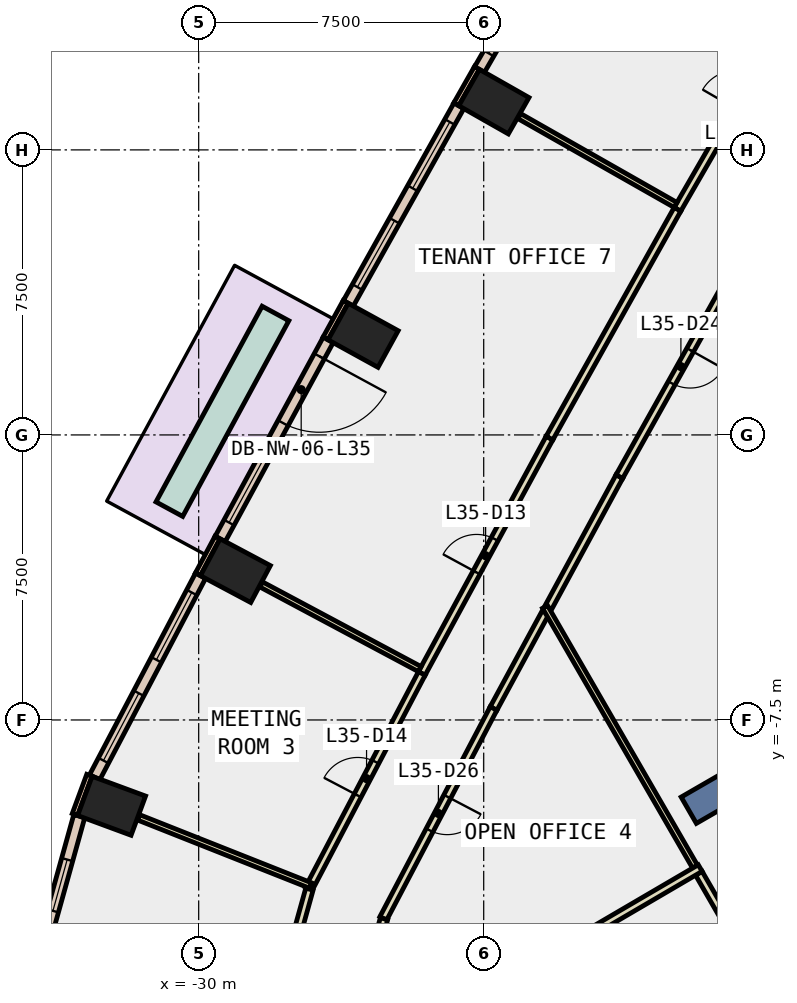
"""IFC4 building model, lengths in metres.
Left out: names, types, materials, properties, quantities, classifications, styles, units other than length and angle.
Written with IfcOpenShell. Run it as: python <this file> out.ifc"""

import sys

from ifc_helpers import new_model, si_unit, direction, frame, frame_2d, origin, origin_2d, place, context, subcontext, project, spatial, rectangle, extrude, element, fill, save


model = new_model("IFC4")
c1 = context("Model", 3, precision=1e-05, world=origin(), true_north=direction((0.0, 1.0)))
c2 = subcontext(c1, "Body", "Model", "MODEL_VIEW")
j1 = project(units=[si_unit("LENGTHUNIT", "METRE"), si_unit("PLANEANGLEUNIT", "RADIAN")], contexts=[c1])
p1 = place(None, origin())
s1 = spatial("IfcSite", under=j1, at=p1, CompositionType="ELEMENT")
p2 = place(p1, origin())
s2 = spatial("IfcBuilding", under=s1, at=p2, CompositionType="ELEMENT")
p3 = place(p2, frame((0.0, 0.0, 159.2)))
s3 = spatial("IfcBuildingStorey", under=s2, at=p3, CompositionType="ELEMENT", Elevation=159.2)
for number, where, z_axis, x_axis in (
    (1, (-22.232, 8.769, -0.4), (0.0, 0.0, 1.0), (0.494, 0.869, 0.0)),
    (2, (-25.673, 2.622, -0.4), (0.0, 0.0, 1.0), (0.482, 0.876, 0.0)),
    (3, (-29.034, -3.571, -0.4), (0.0, 0.0, 1.0), (0.47, 0.883, 0.0)),
    (4, (-32.292, -9.758, -0.4), (0.0, 0.0, 1.0), (0.347, 0.938, 0.0)),
):
    element("IfcColumn", number, at=place(p3, frame(where, z_axis=z_axis, x_axis=x_axis)), inside=s3, PredefinedType="COLUMN", context=c2, shape_type="SweptSolid", body=[
        extrude(rectangle(XDim=1.1, YDim=1.5, at=origin_2d()), origin(), (0.0, 0.0, 1.0), 4.2),
    ])
p4 = place(p3, frame((-9.31, -5.375, -0.4), z_axis=(0.0, 0.0, 1.0), x_axis=(-0.866017533419, -0.500013631625, 0.0)))
e5 = element("IfcWall", 5, at=p4, inside=s3, PredefinedType="SHEAR", context=c2, shape_type="SweptSolid", body=[
    extrude(rectangle(XDim=9.0, YDim=0.8, at=frame_2d((4.5, 0.0))), origin(), (0.0, 0.0, 1.0), 4.2),
])
for number, where, z_axis, x_axis in (
    (6, (-22.678, 9.655, 0.0), (0.0, 0.0, 1.0), (-0.495, -0.869, 0.0)),
    (7, (-26.131, 3.502, 0.0), (0.0, 0.0, 1.0), (-0.482, -0.876, 0.0)),
):
    element("IfcWall", number, at=place(p3, frame(where, z_axis=z_axis, x_axis=x_axis)), inside=s3, PredefinedType="STANDARD", context=c2, shape_type="SweptSolid", body=[
        extrude(rectangle(XDim=1.1, YDim=0.15, at=frame_2d((0.55, 0.0))), origin(), (0.0, 0.0, 1.0), 3.8),
    ])
for number, where, z_axis, x_axis in (
    (8, (-29.503, -2.698, 0.0), (0.0, 0.0, 1.0), (-0.47, -0.883, 0.0)),
    (9, (-32.875, -8.956, 0.0), (0.0, 0.0, 1.0), (-0.346, -0.938, 0.0)),
):
    element("IfcWall", number, at=place(p3, frame(where, z_axis=z_axis, x_axis=x_axis)), inside=s3, PredefinedType="STANDARD", context=c2, shape_type="SweptSolid", body=[
        extrude(rectangle(XDim=1.1, YDim=0.15, at=frame_2d((0.55, 0.0))), origin(), (0.0, 0.0, 1.0), 3.8),
    ])
p5 = place(p3, frame((-19.631, 14.774, 0.0), z_axis=(0.0, 0.0, 1.0), x_axis=(-0.500061823953, -0.865989706766, 0.0)))
e10 = element("IfcWall", 10, at=p5, inside=s3, PredefinedType="STANDARD", context=c2, shape_type="SweptSolid", body=[
    extrude(rectangle(XDim=5.957, YDim=0.3, at=frame_2d((2.979, 0.0))), origin(), (0.0, 0.0, 1.0), 3.8),
])
p6 = place(p5, frame((0.489, 0.0, 0.9)))
e11 = element("IfcOpeningElement", 11, at=p6, cuts=e10, PredefinedType="OPENING", context=c2, shape_type="SweptSolid", body=[
    extrude(rectangle(XDim=2.0, YDim=2.6, at=frame_2d((1.0, 1.3))), frame((0.0, 0.16, 0.0), z_axis=(0.0, -1.0, 0.0), x_axis=(1.0, 0.0, 0.0)), (0.0, 0.0, 1.0), 0.32),
])
p7 = place(p5, frame((3.468, 0.0, 0.9)))
e12 = element("IfcOpeningElement", 12, at=p7, cuts=e10, PredefinedType="OPENING", context=c2, shape_type="SweptSolid", body=[
    extrude(rectangle(XDim=2.0, YDim=2.6, at=frame_2d((1.0, 1.3))), frame((0.0, 0.16, 0.0), z_axis=(0.0, -1.0, 0.0), x_axis=(1.0, 0.0, 0.0)), (0.0, 0.0, 1.0), 0.32),
])
p8 = place(p3, frame((-23.153, 8.661, 0.0), z_axis=(0.0, 0.0, 1.0), x_axis=(-0.488354983501, -0.872645065356, 0.0)))
e13 = element("IfcWall", 13, at=p8, inside=s3, PredefinedType="STANDARD", context=c2, shape_type="SweptSolid", body=[
    extrude(rectangle(XDim=5.957, YDim=0.3, at=frame_2d((2.978, 0.0))), origin(), (0.0, 0.0, 1.0), 3.8),
])
p9 = place(p8, frame((0.489, 0.0, 0.9)))
e14 = element("IfcOpeningElement", 14, at=p9, cuts=e13, PredefinedType="OPENING", context=c2, shape_type="SweptSolid", body=[
    extrude(rectangle(XDim=2.0, YDim=2.6, at=frame_2d((1.0, 1.3))), frame((0.0, 0.16, 0.0), z_axis=(0.0, -1.0, 0.0), x_axis=(1.0, 0.0, 0.0)), (0.0, 0.0, 1.0), 0.32),
])
p10 = place(p8, frame((3.467, 0.0, 0.9)))
e15 = element("IfcOpeningElement", 15, at=p10, cuts=e13, PredefinedType="OPENING", context=c2, shape_type="SweptSolid", body=[
    extrude(rectangle(XDim=2.0, YDim=2.6, at=frame_2d((1.0, 1.3))), frame((0.0, 0.16, 0.0), z_axis=(0.0, -1.0, 0.0), x_axis=(1.0, 0.0, 0.0)), (0.0, 0.0, 1.0), 0.32),
])
p11 = place(p3, frame((-26.592, 2.501, 0.0), z_axis=(0.0, 0.0, 1.0), x_axis=(-0.476970695077, -0.878919197673, 0.0)))
e16 = element("IfcWall", 16, at=p11, inside=s3, PredefinedType="STANDARD", context=c2, shape_type="SweptSolid", body=[
    extrude(rectangle(XDim=5.958, YDim=0.3, at=frame_2d((2.979, 0.0))), origin(), (0.0, 0.0, 1.0), 3.8),
])
p12 = place(p11, frame((0.49, 0.0, 0.0)))
e17 = element("IfcOpeningElement", 17, at=p12, cuts=e16, PredefinedType="OPENING", context=c2, shape_type="SweptSolid", body=[
    extrude(rectangle(XDim=2.0, YDim=2.4, at=frame_2d((1.0, 1.2))), frame((0.0, 0.16, 0.0), z_axis=(0.0, -1.0, 0.0), x_axis=(1.0, 0.0, 0.0)), (0.0, 0.0, 1.0), 0.32),
])
p13 = place(p11, frame((3.469, 0.0, 0.9)))
e18 = element("IfcOpeningElement", 18, at=p13, cuts=e16, PredefinedType="OPENING", context=c2, shape_type="SweptSolid", body=[
    extrude(rectangle(XDim=2.0, YDim=2.6, at=frame_2d((1.0, 1.3))), frame((0.0, 0.16, 0.0), z_axis=(0.0, -1.0, 0.0), x_axis=(1.0, 0.0, 0.0)), (0.0, 0.0, 1.0), 0.32),
])
p14 = place(p3, frame((-29.951, -3.705, 0.0), z_axis=(0.0, 0.0, 1.0), x_axis=(-0.465104650407, -0.885255705528, 0.0)))
e19 = element("IfcWall", 19, at=p14, inside=s3, PredefinedType="STANDARD", context=c2, shape_type="SweptSolid", body=[
    extrude(rectangle(XDim=5.99, YDim=0.3, at=frame_2d((2.995, 0.0))), origin(), (0.0, 0.0, 1.0), 3.8),
])
p15 = place(p14, frame((0.498, 0.0, 0.9)))
e20 = element("IfcOpeningElement", 20, at=p15, cuts=e19, PredefinedType="OPENING", context=c2, shape_type="SweptSolid", body=[
    extrude(rectangle(XDim=2.0, YDim=2.6, at=frame_2d((1.0, 1.3))), frame((0.0, 0.16, 0.0), z_axis=(0.0, -1.0, 0.0), x_axis=(1.0, 0.0, 0.0)), (0.0, 0.0, 1.0), 0.32),
])
p16 = place(p14, frame((3.493, 0.0, 0.9)))
e21 = element("IfcOpeningElement", 21, at=p16, cuts=e19, PredefinedType="OPENING", context=c2, shape_type="SweptSolid", body=[
    extrude(rectangle(XDim=2.0, YDim=2.6, at=frame_2d((1.0, 1.3))), frame((0.0, 0.16, 0.0), z_axis=(0.0, -1.0, 0.0), x_axis=(1.0, 0.0, 0.0)), (0.0, 0.0, 1.0), 0.32),
])
p17 = place(p3, frame((-33.142, -10.029, 0.0), z_axis=(0.0, 0.0, 1.0), x_axis=(-0.26799398221, -0.963420585985, 0.0)))
e22 = element("IfcWall", 22, at=p17, inside=s3, PredefinedType="STANDARD", context=c2, shape_type="SweptSolid", body=[
    extrude(rectangle(XDim=3.776, YDim=0.3, at=frame_2d((1.888, 0.0))), origin(), (0.0, 0.0, 1.0), 3.8),
])
p18 = place(p17, frame((1.188, 0.0, 0.9)))
e23 = element("IfcOpeningElement", 23, at=p18, cuts=e22, PredefinedType="OPENING", context=c2, shape_type="SweptSolid", body=[
    extrude(rectangle(XDim=1.4, YDim=2.6, at=frame_2d((0.7, 1.3))), frame((0.0, 0.16, 0.0), z_axis=(0.0, -1.0, 0.0), x_axis=(1.0, 0.0, 0.0)), (0.0, 0.0, 1.0), 0.32),
])
p19 = place(p3, frame((-27.979, 3.196, 0.0), z_axis=(0.0, 0.0, 1.0), x_axis=(-0.476806707813, -0.87900817026, 0.0)))
e24 = element("IfcWall", 24, at=p19, inside=s3, PredefinedType="STANDARD", context=c2, shape_type="SweptSolid", body=[
    extrude(rectangle(XDim=5.858, YDim=0.8, at=frame_2d((2.929, 0.0))), origin(), (0.0, 0.0, 1.0), 0.8),
])
p20 = place(p3, frame((-18.93, -1.095, 0.0), z_axis=(0.0, 0.0, 1.0), x_axis=(-0.476854303058, -0.878982351162, 0.0)))
e25 = element("IfcWall", 25, at=p20, inside=s3, PredefinedType="PARTITIONING", context=c2, shape_type="SweptSolid", body=[
    extrude(rectangle(XDim=3.924, YDim=0.2, at=frame_2d((1.962, 0.0))), origin(), (0.0, 0.0, 1.0), 3.8),
])
p21 = place(p3, frame((-15.692, 4.689, 0.0), z_axis=(0.0, 0.0, 1.0), x_axis=(-0.48849233301, -0.872568186786, 0.0)))
e26 = element("IfcWall", 26, at=p21, inside=s3, PredefinedType="PARTITIONING", context=c2, shape_type="SweptSolid", body=[
    extrude(rectangle(XDim=6.629, YDim=0.2, at=frame_2d((3.314, 0.0))), origin(), (0.0, 0.0, 1.0), 3.8),
])
p22 = place(p21, frame((2.814, 0.0, 0.0)))
e27 = element("IfcOpeningElement", 27, at=p22, cuts=e26, PredefinedType="OPENING", context=c2, shape_type="SweptSolid", body=[
    extrude(rectangle(XDim=1.0, YDim=2.1, at=frame_2d((0.5, 1.05))), frame((0.0, 0.11, 0.0), z_axis=(0.0, -1.0, 0.0), x_axis=(1.0, 0.0, 0.0)), (0.0, 0.0, 1.0), 0.22),
])
p23 = place(p3, frame((-20.873, -4.676, 0.0), z_axis=(0.0, 0.0, 1.0), x_axis=(-0.476781985736, -0.879021579984, 0.0)))
e28 = element("IfcWall", 28, at=p23, inside=s3, PredefinedType="PARTITIONING", context=c2, shape_type="SweptSolid", body=[
    extrude(rectangle(XDim=2.869, YDim=0.2, at=frame_2d((1.435, 0.0))), origin(), (0.0, 0.0, 1.0), 3.8),
])
p24 = place(p3, frame((-22.241, -7.198, 0.0), z_axis=(0.0, 0.0, 1.0), x_axis=(-0.465089990515, -0.885263407536, 0.0)))
e29 = element("IfcWall", 29, at=p24, inside=s3, PredefinedType="PARTITIONING", context=c2, shape_type="SweptSolid", body=[
    extrude(rectangle(XDim=6.24, YDim=0.2, at=frame_2d((3.12, 0.0))), origin(), (0.0, 0.0, 1.0), 3.8),
])
p25 = place(p24, frame((2.62, 0.0, 0.0)))
e30 = element("IfcOpeningElement", 30, at=p25, cuts=e29, PredefinedType="OPENING", context=c2, shape_type="SweptSolid", body=[
    extrude(rectangle(XDim=1.0, YDim=2.1, at=frame_2d((0.5, 1.05))), frame((0.0, 0.11, 0.0), z_axis=(0.0, -1.0, 0.0), x_axis=(1.0, 0.0, 0.0)), (0.0, 0.0, 1.0), 0.22),
])
p26 = place(p3, frame((-25.123, -12.73, 0.0), z_axis=(0.0, 0.0, 1.0), x_axis=(-0.268139825244, -0.963380005044, 0.0)))
e31 = element("IfcWall", 31, at=p26, inside=s3, PredefinedType="PARTITIONING", context=c2, shape_type="SweptSolid", body=[
    extrude(rectangle(XDim=1.726, YDim=0.2, at=frame_2d((0.863, 0.0))), origin(), (0.0, 0.0, 1.0), 3.8),
])
p27 = place(p3, frame((-17.402, 5.936, 0.0), z_axis=(0.0, 0.0, 1.0), x_axis=(0.500135788517, 0.865946992052, 0.0)))
e32 = element("IfcWall", 32, at=p27, inside=s3, PredefinedType="PARTITIONING", context=c2, shape_type="SweptSolid", body=[
    extrude(rectangle(XDim=6.97, YDim=0.2, at=frame_2d((3.485, 0.0))), origin(), (0.0, 0.0, 1.0), 3.8),
])
p28 = place(p27, frame((3.06, 0.0, 0.0)))
e33 = element("IfcOpeningElement", 33, at=p28, cuts=e32, PredefinedType="OPENING", context=c2, shape_type="SweptSolid", body=[
    extrude(rectangle(XDim=1.0, YDim=2.1, at=frame_2d((0.5, 1.05))), frame((0.0, 0.11, 0.0), z_axis=(0.0, -1.0, 0.0), x_axis=(1.0, 0.0, 0.0)), (0.0, 0.0, 1.0), 0.22),
])
p29 = place(p3, frame((-24.13, -6.275, 0.0), z_axis=(0.0, 0.0, 1.0), x_axis=(0.476981750532, 0.878913198023, 0.0)))
e34 = element("IfcWall", 34, at=p29, inside=s3, PredefinedType="PARTITIONING", context=c2, shape_type="SweptSolid", body=[
    extrude(rectangle(XDim=7.046, YDim=0.2, at=frame_2d((3.523, 0.0))), origin(), (0.0, 0.0, 1.0), 3.8),
])
p30 = place(p29, frame((3.023, 0.0, 0.0)))
e35 = element("IfcOpeningElement", 35, at=p30, cuts=e34, PredefinedType="OPENING", context=c2, shape_type="SweptSolid", body=[
    extrude(rectangle(XDim=1.0, YDim=2.1, at=frame_2d((0.5, 1.05))), frame((0.0, 0.11, 0.0), z_axis=(0.0, -1.0, 0.0), x_axis=(1.0, 0.0, 0.0)), (0.0, 0.0, 1.0), 0.22),
])
p31 = place(p3, frame((-20.769, -0.082, 0.0), z_axis=(0.0, 0.0, 1.0), x_axis=(0.488387759141, 0.872626722443, 0.0)))
e36 = element("IfcWall", 36, at=p31, inside=s3, PredefinedType="PARTITIONING", context=c2, shape_type="SweptSolid", body=[
    extrude(rectangle(XDim=6.896, YDim=0.2, at=frame_2d((3.448, 0.0))), origin(), (0.0, 0.0, 1.0), 3.8),
])
p32 = place(p3, frame((-27.106, -11.944, 0.0), z_axis=(0.0, 0.0, 1.0), x_axis=(0.464985599417, 0.885318243534, 0.0)))
e37 = element("IfcWall", 37, at=p32, inside=s3, PredefinedType="PARTITIONING", context=c2, shape_type="SweptSolid", body=[
    extrude(rectangle(XDim=6.402, YDim=0.2, at=frame_2d((3.201, 0.0))), origin(), (0.0, 0.0, 1.0), 3.8),
])
p33 = place(p32, frame((2.776, 0.0, 0.0)))
e38 = element("IfcOpeningElement", 38, at=p33, cuts=e37, PredefinedType="OPENING", context=c2, shape_type="SweptSolid", body=[
    extrude(rectangle(XDim=1.0, YDim=2.1, at=frame_2d((0.5, 1.05))), frame((0.0, 0.11, 0.0), z_axis=(0.0, -1.0, 0.0), x_axis=(1.0, 0.0, 0.0)), (0.0, 0.0, 1.0), 0.22),
])
p34 = place(p3, frame((-27.76, -14.376, 0.0), z_axis=(0.0, 0.0, 1.0), x_axis=(0.267909096687, 0.963444194498, 0.0)))
e39 = element("IfcWall", 39, at=p34, inside=s3, PredefinedType="PARTITIONING", context=c2, shape_type="SweptSolid", body=[
    extrude(rectangle(XDim=2.516, YDim=0.2, at=frame_2d((1.258, 0.0))), origin(), (0.0, 0.0, 1.0), 3.8),
])
p35 = place(p3, frame((-16.939, -11.36, 0.0), z_axis=(0.0, 0.0, 1.0), x_axis=(-0.500053473428, 0.865994528685, 0.0)))
e40 = element("IfcWall", 40, at=p35, inside=s3, PredefinedType="PARTITIONING", context=c2, shape_type="SweptSolid", body=[
    extrude(rectangle(XDim=7.895, YDim=0.15, at=frame_2d((3.948, 0.0))), origin(), (0.0, 0.0, 1.0), 3.8),
])
p36 = place(p3, frame((-15.18, -14.408, 0.0), z_axis=(0.0, 0.0, 1.0), x_axis=(-0.499968694491, 0.866043477274, 0.0)))
e41 = element("IfcWall", 41, at=p36, inside=s3, PredefinedType="PARTITIONING", context=c2, shape_type="SweptSolid", body=[
    extrude(rectangle(XDim=3.319, YDim=0.2, at=frame_2d((1.659, 0.0))), origin(), (0.0, 0.0, 1.0), 3.8),
])
p37 = place(p3, frame((-16.803, -11.397, 0.0), z_axis=(0.0, 0.0, 1.0), x_axis=(-0.863203941699, -0.504855380318, 0.0)))
e42 = element("IfcWall", 42, at=p37, inside=s3, PredefinedType="PARTITIONING", context=c2, shape_type="SweptSolid", body=[
    extrude(rectangle(XDim=8.232, YDim=0.2, at=frame_2d((4.116, 0.0))), origin(), (0.0, 0.0, 1.0), 3.8),
])
p38 = place(p3, frame((-17.451, 6.051, 0.0), z_axis=(0.0, 0.0, 1.0), x_axis=(-0.869409691741, 0.494091882049, 0.0)))
e43 = element("IfcWall", 43, at=p38, inside=s3, PredefinedType="PARTITIONING", context=c2, shape_type="SweptSolid", body=[
    extrude(rectangle(XDim=4.73, YDim=0.15, at=frame_2d((2.365, 0.0))), origin(), (0.0, 0.0, 1.0), 3.8),
])
p39 = place(p3, frame((-24.182, -6.162, 0.0), z_axis=(0.0, 0.0, 1.0), x_axis=(-0.88214427755, 0.470979270866, 0.0)))
e44 = element("IfcWall", 44, at=p39, inside=s3, PredefinedType="PARTITIONING", context=c2, shape_type="SweptSolid", body=[
    extrude(rectangle(XDim=4.731, YDim=0.15, at=frame_2d((2.365, 0.0))), origin(), (0.0, 0.0, 1.0), 3.8),
])
p40 = place(p3, frame((-27.059, -11.855, 0.0), z_axis=(0.0, 0.0, 1.0), x_axis=(-0.92964843089, 0.368447818481, 0.0)))
e45 = element("IfcWall", 45, at=p40, inside=s3, PredefinedType="PARTITIONING", context=c2, shape_type="SweptSolid", body=[
    extrude(rectangle(XDim=4.866, YDim=0.15, at=frame_2d((2.433, 0.0))), origin(), (0.0, 0.0, 1.0), 3.8),
])
p41 = place(p7, origin())
e46 = element("IfcWindow", 46, at=p41, inside=s3, PartitioningType="SINGLE_PANEL", PredefinedType="WINDOW", context=c2, shape_type="SweptSolid", body=[
    extrude(rectangle(XDim=2.0, YDim=2.6, at=frame_2d((1.0, 1.3))), frame((0.0, 0.03, 0.0), z_axis=(0.0, -1.0, 0.0), x_axis=(1.0, 0.0, 0.0)), (0.0, 0.0, 1.0), 0.06),
])
fill(e12, e46)
p42 = place(p9, origin())
e47 = element("IfcWindow", 47, at=p42, inside=s3, PartitioningType="SINGLE_PANEL", PredefinedType="WINDOW", context=c2, shape_type="SweptSolid", body=[
    extrude(rectangle(XDim=2.0, YDim=2.6, at=frame_2d((1.0, 1.3))), frame((0.0, 0.03, 0.0), z_axis=(0.0, -1.0, 0.0), x_axis=(1.0, 0.0, 0.0)), (0.0, 0.0, 1.0), 0.06),
])
fill(e14, e47)
p43 = place(p10, origin())
e48 = element("IfcWindow", 48, at=p43, inside=s3, PartitioningType="SINGLE_PANEL", PredefinedType="WINDOW", context=c2, shape_type="SweptSolid", body=[
    extrude(rectangle(XDim=2.0, YDim=2.6, at=frame_2d((1.0, 1.3))), frame((0.0, 0.03, 0.0), z_axis=(0.0, -1.0, 0.0), x_axis=(1.0, 0.0, 0.0)), (0.0, 0.0, 1.0), 0.06),
])
fill(e15, e48)
p44 = place(p12, origin())
e49 = element("IfcDoor", 49, at=p44, inside=s3, OperationType="SLIDING_TO_LEFT", PredefinedType="DOOR", context=c2, shape_type="SweptSolid", body=[
    extrude(rectangle(XDim=2.0, YDim=2.4, at=frame_2d((1.0, 1.2))), frame((0.0, 0.025, 0.0), z_axis=(0.0, -1.0, 0.0), x_axis=(1.0, 0.0, 0.0)), (0.0, 0.0, 1.0), 0.05),
])
fill(e17, e49)
p45 = place(p13, origin())
e50 = element("IfcWindow", 50, at=p45, inside=s3, PartitioningType="SINGLE_PANEL", PredefinedType="WINDOW", context=c2, shape_type="SweptSolid", body=[
    extrude(rectangle(XDim=2.0, YDim=2.6, at=frame_2d((1.0, 1.3))), frame((0.0, 0.03, 0.0), z_axis=(0.0, -1.0, 0.0), x_axis=(1.0, 0.0, 0.0)), (0.0, 0.0, 1.0), 0.06),
])
fill(e18, e50)
p46 = place(p15, origin())
e51 = element("IfcWindow", 51, at=p46, inside=s3, PartitioningType="SINGLE_PANEL", PredefinedType="WINDOW", context=c2, shape_type="SweptSolid", body=[
    extrude(rectangle(XDim=2.0, YDim=2.6, at=frame_2d((1.0, 1.3))), frame((0.0, 0.03, 0.0), z_axis=(0.0, -1.0, 0.0), x_axis=(1.0, 0.0, 0.0)), (0.0, 0.0, 1.0), 0.06),
])
fill(e20, e51)
p47 = place(p16, origin())
e52 = element("IfcWindow", 52, at=p47, inside=s3, PartitioningType="SINGLE_PANEL", PredefinedType="WINDOW", context=c2, shape_type="SweptSolid", body=[
    extrude(rectangle(XDim=2.0, YDim=2.6, at=frame_2d((1.0, 1.3))), frame((0.0, 0.03, 0.0), z_axis=(0.0, -1.0, 0.0), x_axis=(1.0, 0.0, 0.0)), (0.0, 0.0, 1.0), 0.06),
])
fill(e21, e52)
p48 = place(p18, origin())
e53 = element("IfcWindow", 53, at=p48, inside=s3, PartitioningType="SINGLE_PANEL", PredefinedType="WINDOW", context=c2, shape_type="SweptSolid", body=[
    extrude(rectangle(XDim=1.4, YDim=2.6, at=frame_2d((0.7, 1.3))), frame((0.0, 0.03, 0.0), z_axis=(0.0, -1.0, 0.0), x_axis=(1.0, 0.0, 0.0)), (0.0, 0.0, 1.0), 0.06),
])
fill(e23, e53)
p49 = place(p30, origin())
e54 = element("IfcDoor", 54, at=p49, inside=s3, OperationType="SINGLE_SWING_RIGHT", PredefinedType="DOOR", context=c2, shape_type="SweptSolid", body=[
    extrude(rectangle(XDim=1.0, YDim=2.1, at=frame_2d((0.5, 1.05))), frame((0.0, 0.025, 0.0), z_axis=(0.0, -1.0, 0.0), x_axis=(1.0, 0.0, 0.0)), (0.0, 0.0, 1.0), 0.05),
])
fill(e35, e54)
p50 = place(p33, origin())
e55 = element("IfcDoor", 55, at=p50, inside=s3, OperationType="SINGLE_SWING_LEFT", PredefinedType="DOOR", context=c2, shape_type="SweptSolid", body=[
    extrude(rectangle(XDim=1.0, YDim=2.1, at=frame_2d((0.5, 1.05))), frame((0.0, 0.025, 0.0), z_axis=(0.0, -1.0, 0.0), x_axis=(1.0, 0.0, 0.0)), (0.0, 0.0, 1.0), 0.05),
])
fill(e38, e55)
p51 = place(p22, origin())
e56 = element("IfcDoor", 56, at=p51, inside=s3, OperationType="SINGLE_SWING_LEFT", PredefinedType="DOOR", context=c2, shape_type="SweptSolid", body=[
    extrude(rectangle(XDim=1.0, YDim=2.1, at=frame_2d((0.5, 1.05))), frame((0.0, 0.025, 0.0), z_axis=(0.0, -1.0, 0.0), x_axis=(1.0, 0.0, 0.0)), (0.0, 0.0, 1.0), 0.05),
])
fill(e27, e56)
p52 = place(p25, origin())
e57 = element("IfcDoor", 57, at=p52, inside=s3, OperationType="SINGLE_SWING_LEFT", PredefinedType="DOOR", context=c2, shape_type="SweptSolid", body=[
    extrude(rectangle(XDim=1.0, YDim=2.1, at=frame_2d((0.5, 1.05))), frame((0.0, 0.025, 0.0), z_axis=(0.0, -1.0, 0.0), x_axis=(1.0, 0.0, 0.0)), (0.0, 0.0, 1.0), 0.05),
])
fill(e30, e57)
save(model, sys.argv[1])
